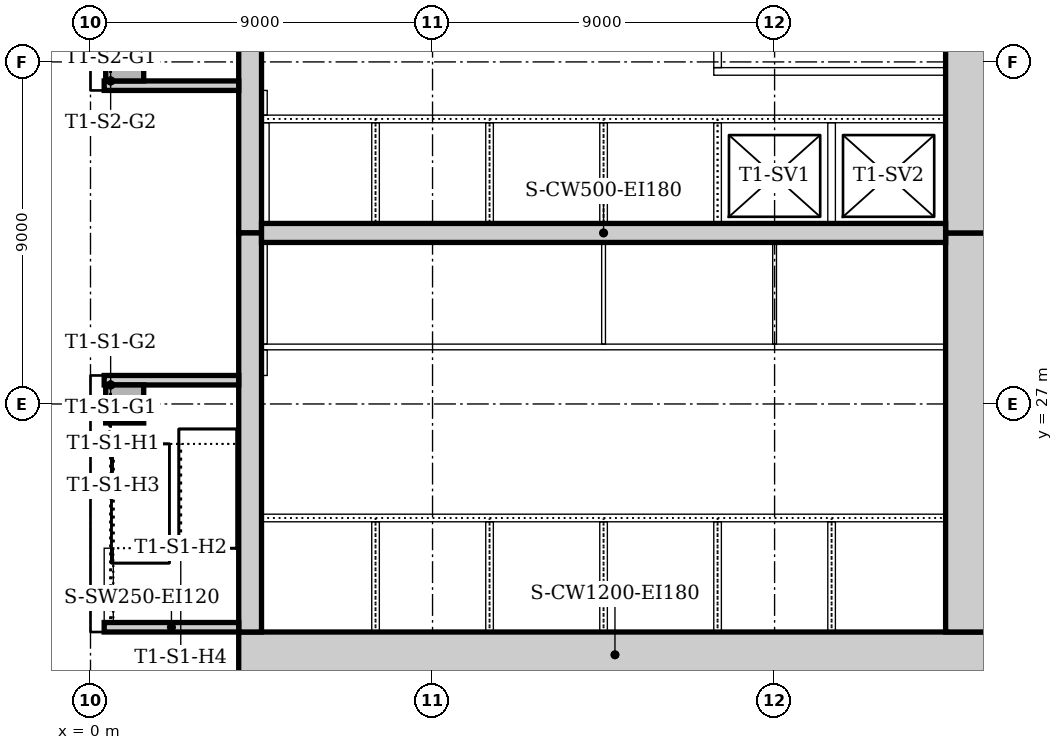
"""IFC4 building model, lengths in metres.
Left out: names, types, materials, properties, quantities, classifications, styles, units other than length and angle.
Written with IfcOpenShell. Run it as: python <this file> out.ifc"""

import sys

from ifc_helpers import new_model, si_unit, direction, frame, frame_2d, origin, origin_2d, place, context, subcontext, project, spatial, rectangle, extrude, element, fill, save


model = new_model("IFC4")
c1 = context("Model", 3, precision=1e-05, world=origin(), true_north=direction((0.0, 1.0)))
c2 = subcontext(c1, "Body", "Model", "MODEL_VIEW")
j1 = project(units=[si_unit("LENGTHUNIT", "METRE"), si_unit("PLANEANGLEUNIT", "RADIAN")], contexts=[c1])
p1 = place(None, origin())
s1 = spatial("IfcSite", under=j1, at=p1, CompositionType="ELEMENT")
p2 = place(p1, origin())
s2 = spatial("IfcBuilding", under=s1, at=p2, CompositionType="ELEMENT")
p3 = place(p2, frame((0.0, 0.0, -5.0)))
s3 = spatial("IfcBuildingStorey", under=s2, at=p3, CompositionType="ELEMENT", Elevation=-5.0)
p4 = place(p3, frame((3.9, 20.4, 0.0), z_axis=(0.0, 0.0, 1.0), x_axis=(1.0, 0.0, 0.0)))
e1 = element("IfcWall", 1, at=p4, inside=s3, PredefinedType="SOLIDWALL", context=c2, shape_type="SweptSolid", body=[
    extrude(rectangle(XDim=19.8, YDim=1.2, at=frame_2d((9.9, 0.0))), origin(), (0.0, 0.0, 1.0), 5.0),
])
p5 = place(p3, frame((23.1, 21.0, 0.0), z_axis=(0.0, 0.0, 1.0), x_axis=(0.0, 1.0, 0.0)))
e2 = element("IfcWall", 2, at=p5, inside=s3, PredefinedType="SOLIDWALL", context=c2, shape_type="SweptSolid", body=[
    extrude(rectangle(XDim=10.5, YDim=1.2, at=frame_2d((5.25, 0.0))), origin(), (0.0, 0.0, 1.0), 5.0),
])
p6 = place(p5, frame((4.35, 0.0, 0.0)))
e3 = element("IfcOpeningElement", 3, at=p6, cuts=e2, PredefinedType="OPENING", context=c2, shape_type="SweptSolid", body=[
    extrude(rectangle(XDim=1.8, YDim=2.1, at=frame_2d((0.9, 1.05))), frame((0.0, 0.61, 0.0), z_axis=(0.0, -1.0, 0.0), x_axis=(1.0, 0.0, 0.0)), (0.0, 0.0, 1.0), 1.22),
])
p7 = place(p3, frame((23.1, 31.5, 0.0), z_axis=(0.0, 0.0, 1.0), x_axis=(0.0, 1.0, 0.0)))
e4 = element("IfcWall", 4, at=p7, inside=s3, PredefinedType="SOLIDWALL", context=c2, shape_type="SweptSolid", body=[
    extrude(rectangle(XDim=10.5, YDim=1.2, at=frame_2d((5.25, 0.0))), origin(), (0.0, 0.0, 1.0), 5.0),
])
p8 = place(p7, frame((3.15, 0.0, 0.0)))
e5 = element("IfcOpeningElement", 5, at=p8, cuts=e4, PredefinedType="OPENING", context=c2, shape_type="SweptSolid", body=[
    extrude(rectangle(XDim=1.0, YDim=2.1, at=frame_2d((0.5, 1.05))), frame((0.0, 0.61, 0.0), z_axis=(0.0, -1.0, 0.0), x_axis=(1.0, 0.0, 0.0)), (0.0, 0.0, 1.0), 1.22),
])
p9 = place(p7, frame((5.2, 0.0, 0.0)))
e6 = element("IfcOpeningElement", 6, at=p9, cuts=e4, PredefinedType="OPENING", context=c2, shape_type="SweptSolid", body=[
    extrude(rectangle(XDim=1.0, YDim=2.1, at=frame_2d((0.5, 1.05))), frame((0.0, 0.61, 0.0), z_axis=(0.0, -1.0, 0.0), x_axis=(1.0, 0.0, 0.0)), (0.0, 0.0, 1.0), 1.22),
])
p10 = place(p3, frame((4.2, 42.0, 0.0), z_axis=(0.0, 0.0, 1.0), x_axis=(0.0, -1.0, 0.0)))
e7 = element("IfcWall", 7, at=p10, inside=s3, PredefinedType="SOLIDWALL", context=c2, shape_type="SweptSolid", body=[
    extrude(rectangle(XDim=10.5, YDim=0.6, at=frame_2d((5.25, 0.0))), origin(), (0.0, 0.0, 1.0), 5.0),
])
p11 = place(p10, frame((5.3, 0.0, 0.0)))
e8 = element("IfcOpeningElement", 8, at=p11, cuts=e7, PredefinedType="OPENING", context=c2, shape_type="SweptSolid", body=[
    extrude(rectangle(XDim=1.0, YDim=2.1, at=frame_2d((0.5, 1.05))), frame((0.0, 0.31, 0.0), z_axis=(0.0, -1.0, 0.0), x_axis=(1.0, 0.0, 0.0)), (0.0, 0.0, 1.0), 0.62),
])
p12 = place(p3, frame((4.2, 31.5, 0.0), z_axis=(0.0, 0.0, 1.0), x_axis=(0.0, -1.0, 0.0)))
e9 = element("IfcWall", 9, at=p12, inside=s3, PredefinedType="SOLIDWALL", context=c2, shape_type="SweptSolid", body=[
    extrude(rectangle(XDim=10.5, YDim=0.6, at=frame_2d((5.25, 0.0))), origin(), (0.0, 0.0, 1.0), 5.0),
])
p13 = place(p12, frame((4.25, 0.0, 0.0)))
e10 = element("IfcOpeningElement", 10, at=p13, cuts=e9, PredefinedType="OPENING", context=c2, shape_type="SweptSolid", body=[
    extrude(rectangle(XDim=1.0, YDim=2.1, at=frame_2d((0.5, 1.05))), frame((0.0, 0.31, 0.0), z_axis=(0.0, -1.0, 0.0), x_axis=(1.0, 0.0, 0.0)), (0.0, 0.0, 1.0), 0.62),
])
p14 = place(p3, frame((4.5, 31.5, 0.0), z_axis=(0.0, 0.0, 1.0), x_axis=(1.0, 0.0, 0.0)))
e11 = element("IfcWall", 11, at=p14, inside=s3, PredefinedType="SOLIDWALL", context=c2, shape_type="SweptSolid", body=[
    extrude(rectangle(XDim=18.0, YDim=0.5, at=frame_2d((9.0, 0.0))), origin(), (0.0, 0.0, 1.0), 5.0),
])
p15 = place(p3, frame((0.36, 21.125, 0.0), z_axis=(0.0, 0.0, 1.0), x_axis=(1.0, 0.0, 0.0)))
e12 = element("IfcWall", 12, at=p15, inside=s3, PredefinedType="SOLIDWALL", context=c2, shape_type="SweptSolid", body=[
    extrude(rectangle(XDim=3.54, YDim=0.25, at=frame_2d((1.77, 0.0))), origin(), (0.0, 0.0, 1.0), 5.0),
])
p16 = place(p3, frame((3.9, 27.625, 0.0), z_axis=(0.0, 0.0, 1.0), x_axis=(-1.0, 0.0, 0.0)))
e13 = element("IfcWall", 13, at=p16, inside=s3, PredefinedType="SOLIDWALL", context=c2, shape_type="SweptSolid", body=[
    extrude(rectangle(XDim=3.54, YDim=0.25, at=frame_2d((1.77, 0.0))), origin(), (0.0, 0.0, 1.0), 5.0),
])
p17 = place(p16, frame((0.4, 0.0, 0.0)))
e14 = element("IfcOpeningElement", 14, at=p17, cuts=e13, PredefinedType="OPENING", context=c2, shape_type="SweptSolid", body=[
    extrude(rectangle(XDim=1.0, YDim=2.1, at=frame_2d((0.5, 1.05))), frame((0.0, 0.135, 0.0), z_axis=(0.0, -1.0, 0.0), x_axis=(1.0, 0.0, 0.0)), (0.0, 0.0, 1.0), 0.27),
])
p18 = place(p3, frame((0.36, 35.375, 0.0), z_axis=(0.0, 0.0, 1.0), x_axis=(1.0, 0.0, 0.0)))
e15 = element("IfcWall", 15, at=p18, inside=s3, PredefinedType="SOLIDWALL", context=c2, shape_type="SweptSolid", body=[
    extrude(rectangle(XDim=3.54, YDim=0.25, at=frame_2d((1.77, 0.0))), origin(), (0.0, 0.0, 1.0), 5.0),
])
p19 = place(p18, frame((2.14, 0.0, 0.0)))
e16 = element("IfcOpeningElement", 16, at=p19, cuts=e15, PredefinedType="OPENING", context=c2, shape_type="SweptSolid", body=[
    extrude(rectangle(XDim=1.0, YDim=2.1, at=frame_2d((0.5, 1.05))), frame((0.0, 0.135, 0.0), z_axis=(0.0, -1.0, 0.0), x_axis=(1.0, 0.0, 0.0)), (0.0, 0.0, 1.0), 0.27),
])
for number, where, z_axis, x_axis in (
    (17, (0.9, 27.0, 0.0), (0.0, 0.0, 1.0), (1.0, 0.0, 0.0)),
    (18, (0.9, 36.0, 0.0), (0.0, 0.0, 1.0), (1.0, 0.0, 0.0)),
):
    element("IfcColumn", number, at=place(p3, frame(where, z_axis=z_axis, x_axis=x_axis)), inside=s3, PredefinedType="COLUMN", context=c2, shape_type="SweptSolid", body=[
        extrude(rectangle(XDim=1.0, YDim=1.0, at=origin_2d()), origin(), (0.0, 0.0, 1.0), 5.0),
    ])
p20 = place(p3, frame((0.48, 21.25, 0.0), z_axis=(0.0, 0.0, 1.0), x_axis=(0.0, 1.0, 0.0)))
e19 = element("IfcWall", 19, at=p20, inside=s3, PredefinedType="STANDARD", context=c2, shape_type="SweptSolid", body=[
    extrude(rectangle(XDim=1.955, YDim=0.24, at=frame_2d((0.978, 0.0))), origin(), (0.0, 0.0, 1.0), 5.0),
])
p21 = place(p3, frame((16.4, 35.75, 0.0), z_axis=(0.0, 0.0, 1.0), x_axis=(1.0, 0.0, 0.0)))
e20 = element("IfcWall", 20, at=p21, inside=s3, PredefinedType="PARTITIONING", context=c2, shape_type="SweptSolid", body=[
    extrude(rectangle(XDim=6.1, YDim=0.2, at=frame_2d((3.05, 0.0))), origin(), (0.0, 0.0, 1.0), 4.7),
])
p22 = place(p3, frame((16.5, 35.85, 0.0), z_axis=(0.0, 0.0, 1.0), x_axis=(0.0, 1.0, 0.0)))
e21 = element("IfcWall", 21, at=p22, inside=s3, PredefinedType="PARTITIONING", context=c2, shape_type="SweptSolid", body=[
    extrude(rectangle(XDim=2.55, YDim=0.2, at=frame_2d((1.275, 0.0))), origin(), (0.0, 0.0, 1.0), 4.7),
])
p23 = place(p3, frame((4.5, 24.0, 0.0), z_axis=(0.0, 0.0, 1.0), x_axis=(1.0, 0.0, 0.0)))
e22 = element("IfcWall", 22, at=p23, inside=s3, PredefinedType="PARTITIONING", context=c2, shape_type="SweptSolid", body=[
    extrude(rectangle(XDim=18.0, YDim=0.2, at=frame_2d((9.0, 0.0))), origin(), (0.0, 0.0, 1.0), 4.7),
])
p24 = place(p3, frame((4.5, 34.5, 0.0), z_axis=(0.0, 0.0, 1.0), x_axis=(1.0, 0.0, 0.0)))
e23 = element("IfcWall", 23, at=p24, inside=s3, PredefinedType="PARTITIONING", context=c2, shape_type="SweptSolid", body=[
    extrude(rectangle(XDim=18.0, YDim=0.2, at=frame_2d((9.0, 0.0))), origin(), (0.0, 0.0, 1.0), 4.7),
])
p25 = place(p24, frame((12.95, 0.0, 0.0)))
e24 = element("IfcOpeningElement", 24, at=p25, cuts=e23, PredefinedType="OPENING", context=c2, shape_type="SweptSolid", body=[
    extrude(rectangle(XDim=1.1, YDim=2.1, at=frame_2d((0.55, 1.05))), frame((0.0, 0.11, 0.0), z_axis=(0.0, -1.0, 0.0), x_axis=(1.0, 0.0, 0.0)), (0.0, 0.0, 1.0), 0.22),
])
p26 = place(p24, frame((15.95, 0.0, 0.0)))
e25 = element("IfcOpeningElement", 25, at=p26, cuts=e23, PredefinedType="OPENING", context=c2, shape_type="SweptSolid", body=[
    extrude(rectangle(XDim=1.1, YDim=2.1, at=frame_2d((0.55, 1.05))), frame((0.0, 0.11, 0.0), z_axis=(0.0, -1.0, 0.0), x_axis=(1.0, 0.0, 0.0)), (0.0, 0.0, 1.0), 0.22),
])
p27 = place(p3, frame((4.6, 31.75, 0.0), z_axis=(0.0, 0.0, 1.0), x_axis=(0.0, 1.0, 0.0)))
e26 = element("IfcWall", 26, at=p27, inside=s3, PredefinedType="PARTITIONING", context=c2, shape_type="SweptSolid", body=[
    extrude(rectangle(XDim=2.65, YDim=0.2, at=frame_2d((1.325, 0.0))), origin(), (0.0, 0.0, 1.0), 4.7),
])
p28 = place(p3, frame((7.5, 21.0, 0.0), z_axis=(0.0, 0.0, 1.0), x_axis=(0.0, 1.0, 0.0)))
e27 = element("IfcWall", 27, at=p28, inside=s3, PredefinedType="PARTITIONING", context=c2, shape_type="SweptSolid", body=[
    extrude(rectangle(XDim=2.9, YDim=0.2, at=frame_2d((1.45, 0.0))), origin(), (0.0, 0.0, 1.0), 4.7),
])
p29 = place(p3, frame((7.5, 31.75, 0.0), z_axis=(0.0, 0.0, 1.0), x_axis=(0.0, 1.0, 0.0)))
e28 = element("IfcWall", 28, at=p29, inside=s3, PredefinedType="PARTITIONING", context=c2, shape_type="SweptSolid", body=[
    extrude(rectangle(XDim=2.65, YDim=0.2, at=frame_2d((1.325, 0.0))), origin(), (0.0, 0.0, 1.0), 4.7),
])
p30 = place(p3, frame((10.5, 21.0, 0.0), z_axis=(0.0, 0.0, 1.0), x_axis=(0.0, 1.0, 0.0)))
e29 = element("IfcWall", 29, at=p30, inside=s3, PredefinedType="PARTITIONING", context=c2, shape_type="SweptSolid", body=[
    extrude(rectangle(XDim=2.9, YDim=0.2, at=frame_2d((1.45, 0.0))), origin(), (0.0, 0.0, 1.0), 4.7),
])
p31 = place(p3, frame((10.5, 31.75, 0.0), z_axis=(0.0, 0.0, 1.0), x_axis=(0.0, 1.0, 0.0)))
e30 = element("IfcWall", 30, at=p31, inside=s3, PredefinedType="PARTITIONING", context=c2, shape_type="SweptSolid", body=[
    extrude(rectangle(XDim=2.65, YDim=0.2, at=frame_2d((1.325, 0.0))), origin(), (0.0, 0.0, 1.0), 4.7),
])
p32 = place(p3, frame((13.5, 21.0, 0.0), z_axis=(0.0, 0.0, 1.0), x_axis=(0.0, 1.0, 0.0)))
e31 = element("IfcWall", 31, at=p32, inside=s3, PredefinedType="PARTITIONING", context=c2, shape_type="SweptSolid", body=[
    extrude(rectangle(XDim=2.9, YDim=0.2, at=frame_2d((1.45, 0.0))), origin(), (0.0, 0.0, 1.0), 4.7),
])
p33 = place(p3, frame((13.5, 31.75, 0.0), z_axis=(0.0, 0.0, 1.0), x_axis=(0.0, 1.0, 0.0)))
e32 = element("IfcWall", 32, at=p33, inside=s3, PredefinedType="PARTITIONING", context=c2, shape_type="SweptSolid", body=[
    extrude(rectangle(XDim=2.65, YDim=0.2, at=frame_2d((1.325, 0.0))), origin(), (0.0, 0.0, 1.0), 4.7),
])
p34 = place(p3, frame((16.5, 21.0, 0.0), z_axis=(0.0, 0.0, 1.0), x_axis=(0.0, 1.0, 0.0)))
e33 = element("IfcWall", 33, at=p34, inside=s3, PredefinedType="PARTITIONING", context=c2, shape_type="SweptSolid", body=[
    extrude(rectangle(XDim=2.9, YDim=0.2, at=frame_2d((1.45, 0.0))), origin(), (0.0, 0.0, 1.0), 4.7),
])
p35 = place(p3, frame((16.5, 31.75, 0.0), z_axis=(0.0, 0.0, 1.0), x_axis=(0.0, 1.0, 0.0)))
e34 = element("IfcWall", 34, at=p35, inside=s3, PredefinedType="PARTITIONING", context=c2, shape_type="SweptSolid", body=[
    extrude(rectangle(XDim=2.65, YDim=0.2, at=frame_2d((1.325, 0.0))), origin(), (0.0, 0.0, 1.0), 4.7),
])
p36 = place(p3, frame((19.5, 21.0, 0.0), z_axis=(0.0, 0.0, 1.0), x_axis=(0.0, 1.0, 0.0)))
e35 = element("IfcWall", 35, at=p36, inside=s3, PredefinedType="PARTITIONING", context=c2, shape_type="SweptSolid", body=[
    extrude(rectangle(XDim=2.9, YDim=0.2, at=frame_2d((1.45, 0.0))), origin(), (0.0, 0.0, 1.0), 4.7),
])
p37 = place(p3, frame((19.5, 31.75, 0.0), z_axis=(0.0, 0.0, 1.0), x_axis=(0.0, 1.0, 0.0)))
e36 = element("IfcWall", 36, at=p37, inside=s3, PredefinedType="PARTITIONING", context=c2, shape_type="SweptSolid", body=[
    extrude(rectangle(XDim=2.65, YDim=0.2, at=frame_2d((1.325, 0.0))), origin(), (0.0, 0.0, 1.0), 4.7),
])
p38 = place(p3, frame((4.5, 28.5, 0.0), z_axis=(0.0, 0.0, 1.0), x_axis=(1.0, 0.0, 0.0)))
e37 = element("IfcWall", 37, at=p38, inside=s3, PredefinedType="PARTITIONING", context=c2, shape_type="SweptSolid", body=[
    extrude(rectangle(XDim=18.0, YDim=0.15, at=frame_2d((9.0, 0.0))), origin(), (0.0, 0.0, 1.0), 4.7),
])
p39 = place(p38, frame((4.1, 0.0, 0.0)))
e38 = element("IfcOpeningElement", 38, at=p39, cuts=e37, PredefinedType="OPENING", context=c2, shape_type="SweptSolid", body=[
    extrude(rectangle(XDim=0.9, YDim=2.1, at=frame_2d((0.45, 1.05))), frame((0.0, 0.085, 0.0), z_axis=(0.0, -1.0, 0.0), x_axis=(1.0, 0.0, 0.0)), (0.0, 0.0, 1.0), 0.17),
])
p40 = place(p38, frame((10.8, 0.0, 0.0)))
e39 = element("IfcOpeningElement", 39, at=p40, cuts=e37, PredefinedType="OPENING", context=c2, shape_type="SweptSolid", body=[
    extrude(rectangle(XDim=0.9, YDim=2.1, at=frame_2d((0.45, 1.05))), frame((0.0, 0.085, 0.0), z_axis=(0.0, -1.0, 0.0), x_axis=(1.0, 0.0, 0.0)), (0.0, 0.0, 1.0), 0.17),
])
p41 = place(p38, frame((15.2, 0.0, 0.0)))
e40 = element("IfcOpeningElement", 40, at=p41, cuts=e37, PredefinedType="OPENING", context=c2, shape_type="SweptSolid", body=[
    extrude(rectangle(XDim=0.9, YDim=2.1, at=frame_2d((0.45, 1.05))), frame((0.0, 0.085, 0.0), z_axis=(0.0, -1.0, 0.0), x_axis=(1.0, 0.0, 0.0)), (0.0, 0.0, 1.0), 0.17),
])
p42 = place(p3, frame((4.575, 27.75, 0.0), z_axis=(0.0, 0.0, 1.0), x_axis=(0.0, 1.0, 0.0)))
e41 = element("IfcWall", 41, at=p42, inside=s3, PredefinedType="PARTITIONING", context=c2, shape_type="SweptSolid", body=[
    extrude(rectangle(XDim=0.675, YDim=0.15, at=frame_2d((0.338, 0.0))), origin(), (0.0, 0.0, 1.0), 4.7),
])
p43 = place(p3, frame((4.575, 28.575, 0.0), z_axis=(0.0, 0.0, 1.0), x_axis=(0.0, 1.0, 0.0)))
e42 = element("IfcWall", 42, at=p43, inside=s3, PredefinedType="PARTITIONING", context=c2, shape_type="SweptSolid", body=[
    extrude(rectangle(XDim=2.675, YDim=0.15, at=frame_2d((1.337, 0.0))), origin(), (0.0, 0.0, 1.0), 4.7),
])
p44 = place(p3, frame((4.575, 34.6, 0.0), z_axis=(0.0, 0.0, 1.0), x_axis=(0.0, 1.0, 0.0)))
e43 = element("IfcWall", 43, at=p44, inside=s3, PredefinedType="PARTITIONING", context=c2, shape_type="SweptSolid", body=[
    extrude(rectangle(XDim=0.65, YDim=0.15, at=frame_2d((0.325, 0.0))), origin(), (0.0, 0.0, 1.0), 4.7),
])
for number, where, z_axis, x_axis in (
    (44, (13.5, 28.575, 0.0), (0.0, 0.0, 1.0), (0.0, 1.0, 0.0)),
    (45, (18.0, 28.575, 0.0), (0.0, 0.0, 1.0), (0.0, 1.0, 0.0)),
):
    element("IfcWall", number, at=place(p3, frame(where, z_axis=z_axis, x_axis=x_axis)), inside=s3, PredefinedType="PARTITIONING", context=c2, shape_type="SweptSolid", body=[
        extrude(rectangle(XDim=2.675, YDim=0.1, at=frame_2d((1.337, 0.0))), origin(), (0.0, 0.0, 1.0), 4.7),
    ])
p45 = place(p13, frame((1.0, 0.0, 0.0), z_axis=(0.0, 0.0, 1.0), x_axis=(-1.0, 0.0, 0.0)))
e46 = element("IfcDoor", 46, at=p45, inside=s3, OperationType="SINGLE_SWING_RIGHT", PredefinedType="DOOR", context=c2, shape_type="SweptSolid", body=[
    extrude(rectangle(XDim=1.0, YDim=2.1, at=frame_2d((0.5, 1.05))), frame((0.0, 0.025, 0.0), z_axis=(0.0, -1.0, 0.0), x_axis=(1.0, 0.0, 0.0)), (0.0, 0.0, 1.0), 0.05),
])
fill(e10, e46)
p46 = place(p17, origin())
e47 = element("IfcDoor", 47, at=p46, inside=s3, OperationType="SINGLE_SWING_LEFT", PredefinedType="DOOR", context=c2, shape_type="SweptSolid", body=[
    extrude(rectangle(XDim=1.0, YDim=2.1, at=frame_2d((0.5, 1.05))), frame((0.0, 0.025, 0.0), z_axis=(0.0, -1.0, 0.0), x_axis=(1.0, 0.0, 0.0)), (0.0, 0.0, 1.0), 0.05),
])
fill(e14, e47)
p47 = place(p11, frame((1.0, 0.0, 0.0), z_axis=(0.0, 0.0, 1.0), x_axis=(-1.0, 0.0, 0.0)))
e48 = element("IfcDoor", 48, at=p47, inside=s3, OperationType="SINGLE_SWING_LEFT", PredefinedType="DOOR", context=c2, shape_type="SweptSolid", body=[
    extrude(rectangle(XDim=1.0, YDim=2.1, at=frame_2d((0.5, 1.05))), frame((0.0, 0.025, 0.0), z_axis=(0.0, -1.0, 0.0), x_axis=(1.0, 0.0, 0.0)), (0.0, 0.0, 1.0), 0.05),
])
fill(e8, e48)
p48 = place(p19, origin())
e49 = element("IfcDoor", 49, at=p48, inside=s3, OperationType="SINGLE_SWING_RIGHT", PredefinedType="DOOR", context=c2, shape_type="SweptSolid", body=[
    extrude(rectangle(XDim=1.0, YDim=2.1, at=frame_2d((0.5, 1.05))), frame((0.0, 0.025, 0.0), z_axis=(0.0, -1.0, 0.0), x_axis=(1.0, 0.0, 0.0)), (0.0, 0.0, 1.0), 0.05),
])
fill(e16, e49)
p49 = place(p25, origin())
e50 = element("IfcDoor", 50, at=p49, inside=s3, OperationType="SLIDING_TO_LEFT", PredefinedType="DOOR", context=c2, shape_type="SweptSolid", body=[
    extrude(rectangle(XDim=1.1, YDim=2.1, at=frame_2d((0.55, 1.05))), frame((0.0, 0.025, 0.0), z_axis=(0.0, -1.0, 0.0), x_axis=(1.0, 0.0, 0.0)), (0.0, 0.0, 1.0), 0.05),
])
fill(e24, e50)
p50 = place(p26, origin())
e51 = element("IfcDoor", 51, at=p50, inside=s3, OperationType="SLIDING_TO_LEFT", PredefinedType="DOOR", context=c2, shape_type="SweptSolid", body=[
    extrude(rectangle(XDim=1.1, YDim=2.1, at=frame_2d((0.55, 1.05))), frame((0.0, 0.025, 0.0), z_axis=(0.0, -1.0, 0.0), x_axis=(1.0, 0.0, 0.0)), (0.0, 0.0, 1.0), 0.05),
])
fill(e25, e51)
p51 = place(p6, frame((1.8, 0.0, 0.0), z_axis=(0.0, 0.0, 1.0), x_axis=(-1.0, 0.0, 0.0)))
e52 = element("IfcDoor", 52, at=p51, inside=s3, OperationType="DOUBLE_DOOR_DOUBLE_SWING", PredefinedType="DOOR", context=c2, shape_type="SweptSolid", body=[
    extrude(rectangle(XDim=1.8, YDim=2.1, at=frame_2d((0.9, 1.05))), frame((0.0, 0.025, 0.0), z_axis=(0.0, -1.0, 0.0), x_axis=(1.0, 0.0, 0.0)), (0.0, 0.0, 1.0), 0.05),
])
fill(e3, e52)
p52 = place(p8, frame((1.0, 0.0, 0.0), z_axis=(0.0, 0.0, 1.0), x_axis=(-1.0, 0.0, 0.0)))
e53 = element("IfcDoor", 53, at=p52, inside=s3, OperationType="SINGLE_SWING_RIGHT", PredefinedType="DOOR", context=c2, shape_type="SweptSolid", body=[
    extrude(rectangle(XDim=1.0, YDim=2.1, at=frame_2d((0.5, 1.05))), frame((0.0, 0.025, 0.0), z_axis=(0.0, -1.0, 0.0), x_axis=(1.0, 0.0, 0.0)), (0.0, 0.0, 1.0), 0.05),
])
fill(e5, e53)
p53 = place(p39, origin())
e54 = element("IfcDoor", 54, at=p53, inside=s3, OperationType="SINGLE_SWING_RIGHT", PredefinedType="DOOR", context=c2, shape_type="SweptSolid", body=[
    extrude(rectangle(XDim=0.9, YDim=2.1, at=frame_2d((0.45, 1.05))), frame((0.0, 0.025, 0.0), z_axis=(0.0, -1.0, 0.0), x_axis=(1.0, 0.0, 0.0)), (0.0, 0.0, 1.0), 0.05),
])
fill(e38, e54)
p54 = place(p40, origin())
e55 = element("IfcDoor", 55, at=p54, inside=s3, OperationType="SINGLE_SWING_LEFT", PredefinedType="DOOR", context=c2, shape_type="SweptSolid", body=[
    extrude(rectangle(XDim=0.9, YDim=2.1, at=frame_2d((0.45, 1.05))), frame((0.0, 0.025, 0.0), z_axis=(0.0, -1.0, 0.0), x_axis=(1.0, 0.0, 0.0)), (0.0, 0.0, 1.0), 0.05),
])
fill(e39, e55)
p55 = place(p41, origin())
e56 = element("IfcDoor", 56, at=p55, inside=s3, OperationType="SINGLE_SWING_RIGHT", PredefinedType="DOOR", context=c2, shape_type="SweptSolid", body=[
    extrude(rectangle(XDim=0.9, YDim=2.1, at=frame_2d((0.45, 1.05))), frame((0.0, 0.025, 0.0), z_axis=(0.0, -1.0, 0.0), x_axis=(1.0, 0.0, 0.0)), (0.0, 0.0, 1.0), 0.05),
])
fill(e40, e56)
save(model, sys.argv[1])
